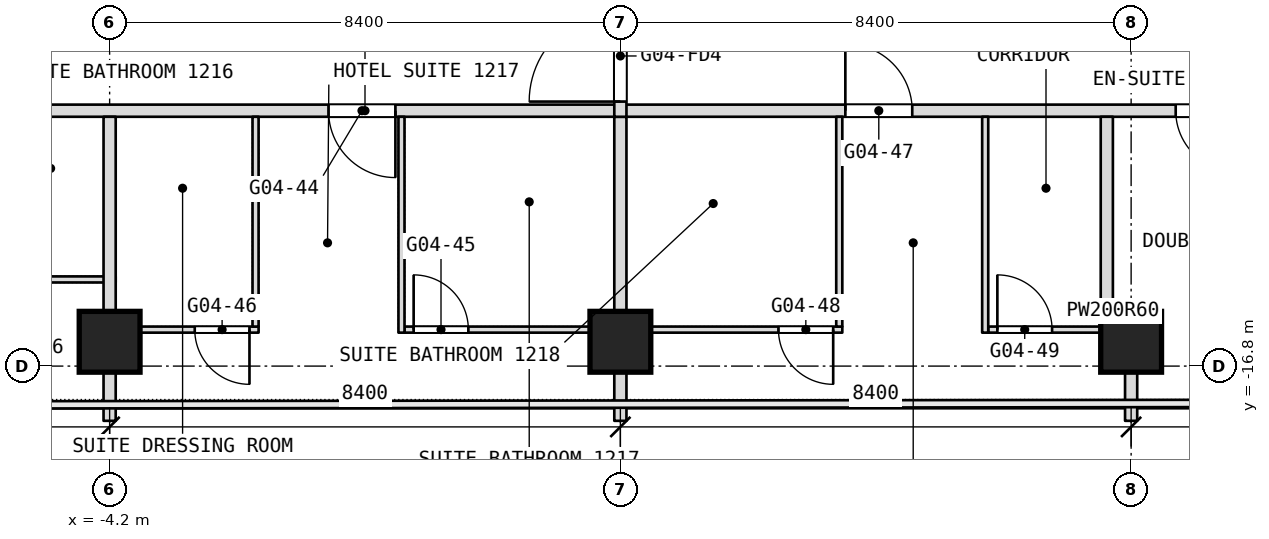
"""IFC4 building model, lengths in metres.
Left out: names, types, materials, properties, quantities, classifications, styles, units other than length and angle.
Written with IfcOpenShell. Run it as: python <this file> out.ifc"""

import sys

from ifc_helpers import new_model, si_unit, direction, frame, frame_2d, origin, origin_2d, place, context, subcontext, project, spatial, rectangle, extrude, element, fill, save


model = new_model("IFC4")
c1 = context("Model", 3, precision=1e-05, world=origin(), true_north=direction((0.0, 1.0)))
c2 = subcontext(c1, "Body", "Model", "MODEL_VIEW")
j1 = project(units=[si_unit("LENGTHUNIT", "METRE"), si_unit("PLANEANGLEUNIT", "RADIAN")], contexts=[c1])
p1 = place(None, origin())
s1 = spatial("IfcSite", under=j1, at=p1, CompositionType="ELEMENT")
p2 = place(p1, origin())
s2 = spatial("IfcBuilding", under=s1, at=p2, CompositionType="ELEMENT")
p3 = place(p2, frame((0.0, 0.0, 58.1)))
s3 = spatial("IfcBuildingStorey", under=s2, at=p3, CompositionType="ELEMENT", Elevation=58.1)
for number, where, z_axis, x_axis in (
    (1, (12.6, -16.4, 0.0), (0.0, 0.0, 1.0), (1.0, 0.0, 0.0)),
    (2, (4.2, -16.4, 0.0), (0.0, 0.0, 1.0), (1.0, 0.0, 0.0)),
    (3, (-4.2, -16.4, 0.0), (0.0, 0.0, 1.0), (1.0, 0.0, 0.0)),
):
    element("IfcColumn", number, at=place(p3, frame(where, z_axis=z_axis, x_axis=x_axis)), inside=s3, PredefinedType="COLUMN", context=c2, shape_type="SweptSolid", body=[
        extrude(rectangle(XDim=1.0, YDim=1.0, at=origin_2d()), origin(), (0.0, 0.0, 1.0), 3.6),
    ])
p4 = place(p3, frame((-4.1, -16.2, 0.0), z_axis=(0.0, 0.0, 1.0), x_axis=(1.0, 0.0, 0.0)))
e4 = element("IfcWall", 4, at=p4, inside=s3, PredefinedType="PARTITIONING", context=c2, shape_type="SweptSolid", body=[
    extrude(rectangle(XDim=2.35, YDim=0.1, at=frame_2d((1.175, 0.0))), origin(), (0.0, 0.0, 1.0), 2.94),
])
p5 = place(p4, frame((1.3, 0.0, 0.0)))
e5 = element("IfcOpeningElement", 5, at=p5, cuts=e4, PredefinedType="OPENING", context=c2, shape_type="SweptSolid", body=[
    extrude(rectangle(XDim=0.9, YDim=2.1, at=frame_2d((0.45, 1.05))), frame((0.0, 0.05, 0.0), z_axis=(0.0, -1.0, 0.0), x_axis=(1.0, 0.0, 0.0)), (0.0, 0.0, 1.0), 0.1),
])
p6 = place(p3, frame((0.65, -16.2, 0.0), z_axis=(0.0, 0.0, 1.0), x_axis=(1.0, 0.0, 0.0)))
e6 = element("IfcWall", 6, at=p6, inside=s3, PredefinedType="PARTITIONING", context=c2, shape_type="SweptSolid", body=[
    extrude(rectangle(XDim=7.2, YDim=0.1, at=frame_2d((3.6, 0.0))), origin(), (0.0, 0.0, 1.0), 2.94),
])
p7 = place(p6, frame((0.15, 0.0, 0.0)))
e7 = element("IfcOpeningElement", 7, at=p7, cuts=e6, PredefinedType="OPENING", context=c2, shape_type="SweptSolid", body=[
    extrude(rectangle(XDim=0.9, YDim=2.1, at=frame_2d((0.45, 1.05))), frame((0.0, 0.05, 0.0), z_axis=(0.0, -1.0, 0.0), x_axis=(1.0, 0.0, 0.0)), (0.0, 0.0, 1.0), 0.1),
])
p8 = place(p6, frame((6.15, 0.0, 0.0)))
e8 = element("IfcOpeningElement", 8, at=p8, cuts=e6, PredefinedType="OPENING", context=c2, shape_type="SweptSolid", body=[
    extrude(rectangle(XDim=0.9, YDim=2.1, at=frame_2d((0.45, 1.05))), frame((0.0, 0.05, 0.0), z_axis=(0.0, -1.0, 0.0), x_axis=(1.0, 0.0, 0.0)), (0.0, 0.0, 1.0), 0.1),
])
p9 = place(p3, frame((10.25, -16.2, 0.0), z_axis=(0.0, 0.0, 1.0), x_axis=(1.0, 0.0, 0.0)))
e9 = element("IfcWall", 9, at=p9, inside=s3, PredefinedType="PARTITIONING", context=c2, shape_type="SweptSolid", body=[
    extrude(rectangle(XDim=2.45, YDim=0.1, at=frame_2d((1.225, 0.0))), origin(), (0.0, 0.0, 1.0), 3.34),
])
p10 = place(p9, frame((0.15, 0.0, 0.0)))
e10 = element("IfcOpeningElement", 10, at=p10, cuts=e9, PredefinedType="OPENING", context=c2, shape_type="SweptSolid", body=[
    extrude(rectangle(XDim=0.9, YDim=2.1, at=frame_2d((0.45, 1.05))), frame((0.0, 0.05, 0.0), z_axis=(0.0, -1.0, 0.0), x_axis=(1.0, 0.0, 0.0)), (0.0, 0.0, 1.0), 0.1),
])
p11 = place(p3, frame((12.1, -15.9, 0.0), z_axis=(0.0, 0.0, 1.0), x_axis=(1.0, 0.0, 0.0)))
e11 = element("IfcWall", 11, at=p11, inside=s3, PredefinedType="PARTITIONING", context=c2, shape_type="SweptSolid", body=[
    extrude(rectangle(XDim=0.4, YDim=0.2, at=frame_2d((0.2, 0.0))), origin(), (0.0, 0.0, 1.0), 3.34),
])
p12 = place(p3, frame((-6.55, -15.375, 0.0), z_axis=(0.0, 0.0, 1.0), x_axis=(1.0, 0.0, 0.0)))
e12 = element("IfcWall", 12, at=p12, inside=s3, PredefinedType="PARTITIONING", context=c2, shape_type="SweptSolid", body=[
    extrude(rectangle(XDim=2.45, YDim=0.1, at=frame_2d((1.225, 0.0))), origin(), (0.0, 0.0, 1.0), 3.34),
])
p13 = place(p12, frame((0.15, 0.0, 0.0)))
e13 = element("IfcOpeningElement", 13, at=p13, cuts=e12, PredefinedType="OPENING", context=c2, shape_type="SweptSolid", body=[
    extrude(rectangle(XDim=0.9, YDim=2.1, at=frame_2d((0.45, 1.05))), frame((0.0, 0.05, 0.0), z_axis=(0.0, -1.0, 0.0), x_axis=(1.0, 0.0, 0.0)), (0.0, 0.0, 1.0), 0.1),
])
p14 = place(p3, frame((12.6, -17.7, 0.0), z_axis=(0.0, 0.0, 1.0), x_axis=(0.0, 1.0, 0.0)))
e14 = element("IfcWall", 14, at=p14, inside=s3, PredefinedType="PARTITIONING", context=c2, shape_type="SweptSolid", body=[
    extrude(rectangle(XDim=1.9, YDim=0.2, at=frame_2d((0.95, 0.0))), origin(), (0.0, 0.0, 1.0), 3.34),
])
p15 = place(p3, frame((-16.7, -12.6, 0.0), z_axis=(0.0, 0.0, 1.0), x_axis=(1.0, 0.0, 0.0)))
e15 = element("IfcWall", 15, at=p15, inside=s3, PredefinedType="PARTITIONING", context=c2, shape_type="SweptSolid", body=[
    extrude(rectangle(XDim=33.4, YDim=0.2, at=frame_2d((16.7, 0.0))), origin(), (0.0, 0.0, 1.0), 3.34),
])
p16 = place(p15, frame((6.9, 0.0, 0.0)))
e16 = element("IfcOpeningElement", 16, at=p16, cuts=e15, PredefinedType="OPENING", context=c2, shape_type="SweptSolid", body=[
    extrude(rectangle(XDim=1.0, YDim=2.1, at=frame_2d((0.5, 1.05))), frame((0.0, 0.1, 0.0), z_axis=(0.0, -1.0, 0.0), x_axis=(1.0, 0.0, 0.0)), (0.0, 0.0, 1.0), 0.2),
])
p17 = place(p15, frame((8.7, 0.0, 0.0)))
e17 = element("IfcOpeningElement", 17, at=p17, cuts=e15, PredefinedType="OPENING", context=c2, shape_type="SweptSolid", body=[
    extrude(rectangle(XDim=1.0, YDim=2.1, at=frame_2d((0.5, 1.05))), frame((0.0, 0.1, 0.0), z_axis=(0.0, -1.0, 0.0), x_axis=(1.0, 0.0, 0.0)), (0.0, 0.0, 1.0), 0.2),
])
p18 = place(p15, frame((16.1, 0.0, 0.0)))
e18 = element("IfcOpeningElement", 18, at=p18, cuts=e15, PredefinedType="OPENING", context=c2, shape_type="SweptSolid", body=[
    extrude(rectangle(XDim=1.1, YDim=2.1, at=frame_2d((0.55, 1.05))), frame((0.0, 0.1, 0.0), z_axis=(0.0, -1.0, 0.0), x_axis=(1.0, 0.0, 0.0)), (0.0, 0.0, 1.0), 0.2),
])
p19 = place(p15, frame((24.6, 0.0, 0.0)))
e19 = element("IfcOpeningElement", 19, at=p19, cuts=e15, PredefinedType="OPENING", context=c2, shape_type="SweptSolid", body=[
    extrude(rectangle(XDim=1.1, YDim=2.1, at=frame_2d((0.55, 1.05))), frame((0.0, 0.1, 0.0), z_axis=(0.0, -1.0, 0.0), x_axis=(1.0, 0.0, 0.0)), (0.0, 0.0, 1.0), 0.2),
])
p20 = place(p15, frame((2.317, 0.0, 0.0)))
e20 = element("IfcOpeningElement", 20, at=p20, cuts=e15, PredefinedType="OPENING", context=c2, shape_type="SweptSolid", body=[
    extrude(rectangle(XDim=1.0, YDim=2.1, at=frame_2d((0.5, 1.05))), frame((0.0, 0.1, 0.0), z_axis=(0.0, -1.0, 0.0), x_axis=(1.0, 0.0, 0.0)), (0.0, 0.0, 1.0), 0.2),
])
p21 = place(p15, frame((30.033, 0.0, 0.0)))
e21 = element("IfcOpeningElement", 21, at=p21, cuts=e15, PredefinedType="OPENING", context=c2, shape_type="SweptSolid", body=[
    extrude(rectangle(XDim=1.0, YDim=2.1, at=frame_2d((0.5, 1.05))), frame((0.0, 0.1, 0.0), z_axis=(0.0, -1.0, 0.0), x_axis=(1.0, 0.0, 0.0)), (0.0, 0.0, 1.0), 0.2),
])
p22 = place(p3, frame((12.2, -15.8, 0.0), z_axis=(0.0, 0.0, 1.0), x_axis=(0.0, 1.0, 0.0)))
e22 = element("IfcWall", 22, at=p22, inside=s3, PredefinedType="PARTITIONING", context=c2, shape_type="SweptSolid", body=[
    extrude(rectangle(XDim=3.1, YDim=0.2, at=frame_2d((1.55, 0.0))), origin(), (0.0, 0.0, 1.0), 3.34),
])
p23 = place(p3, frame((10.2, -16.25, 0.0), z_axis=(0.0, 0.0, 1.0), x_axis=(0.0, 1.0, 0.0)))
e23 = element("IfcWall", 23, at=p23, inside=s3, PredefinedType="PARTITIONING", context=c2, shape_type="SweptSolid", body=[
    extrude(rectangle(XDim=3.55, YDim=0.1, at=frame_2d((1.775, 0.0))), origin(), (0.0, 0.0, 1.0), 3.34),
])
p24 = place(p3, frame((7.8, -16.15, 0.0), z_axis=(0.0, 0.0, 1.0), x_axis=(0.0, 1.0, 0.0)))
e24 = element("IfcWall", 24, at=p24, inside=s3, PredefinedType="PARTITIONING", context=c2, shape_type="SweptSolid", body=[
    extrude(rectangle(XDim=3.45, YDim=0.1, at=frame_2d((1.725, 0.0))), origin(), (0.0, 0.0, 1.0), 3.34),
])
p25 = place(p3, frame((4.2, -17.7, 0.0), z_axis=(0.0, 0.0, 1.0), x_axis=(0.0, 1.0, 0.0)))
e25 = element("IfcWall", 25, at=p25, inside=s3, PredefinedType="PARTITIONING", context=c2, shape_type="SweptSolid", body=[
    extrude(rectangle(XDim=5.0, YDim=0.2, at=frame_2d((2.5, 0.0))), origin(), (0.0, 0.0, 1.0), 3.34),
])
p26 = place(p3, frame((4.2, -12.7, 0.0), z_axis=(0.0, 0.0, 1.0), x_axis=(0.0, 1.0, 0.0)))
e26 = element("IfcWall", 26, at=p26, inside=s3, PredefinedType="PARTITIONING", context=c2, shape_type="SweptSolid", body=[
    extrude(rectangle(XDim=12.7, YDim=0.2, at=frame_2d((6.35, 0.0))), origin(), (0.0, 0.0, 1.0), 3.34),
])
p27 = place(p26, frame((11.05, 0.0, 0.0)))
e27 = element("IfcOpeningElement", 27, at=p27, cuts=e26, PredefinedType="OPENING", context=c2, shape_type="SweptSolid", body=[
    extrude(rectangle(XDim=1.5, YDim=2.1, at=frame_2d((0.75, 1.05))), frame((0.0, 0.1, 0.0), z_axis=(0.0, -1.0, 0.0), x_axis=(1.0, 0.0, 0.0)), (0.0, 0.0, 1.0), 0.2),
])
p28 = place(p26, frame((0.25, 0.0, 0.0)))
e28 = element("IfcOpeningElement", 28, at=p28, cuts=e26, PredefinedType="OPENING", context=c2, shape_type="SweptSolid", body=[
    extrude(rectangle(XDim=1.5, YDim=2.1, at=frame_2d((0.75, 1.05))), frame((0.0, 0.1, 0.0), z_axis=(0.0, -1.0, 0.0), x_axis=(1.0, 0.0, 0.0)), (0.0, 0.0, 1.0), 0.2),
])
p29 = place(p3, frame((0.6, -16.25, 0.0), z_axis=(0.0, 0.0, 1.0), x_axis=(0.0, 1.0, 0.0)))
e29 = element("IfcWall", 29, at=p29, inside=s3, PredefinedType="PARTITIONING", context=c2, shape_type="SweptSolid", body=[
    extrude(rectangle(XDim=3.55, YDim=0.1, at=frame_2d((1.775, 0.0))), origin(), (0.0, 0.0, 1.0), 3.34),
])
p30 = place(p3, frame((-1.8, -16.15, 0.0), z_axis=(0.0, 0.0, 1.0), x_axis=(0.0, 1.0, 0.0)))
e30 = element("IfcWall", 30, at=p30, inside=s3, PredefinedType="PARTITIONING", context=c2, shape_type="SweptSolid", body=[
    extrude(rectangle(XDim=3.45, YDim=0.1, at=frame_2d((1.725, 0.0))), origin(), (0.0, 0.0, 1.0), 3.34),
])
p31 = place(p3, frame((-4.2, -17.7, 0.0), z_axis=(0.0, 0.0, 1.0), x_axis=(0.0, 1.0, 0.0)))
e31 = element("IfcWall", 31, at=p31, inside=s3, PredefinedType="PARTITIONING", context=c2, shape_type="SweptSolid", body=[
    extrude(rectangle(XDim=5.0, YDim=0.2, at=frame_2d((2.5, 0.0))), origin(), (0.0, 0.0, 1.0), 3.34),
])
p32 = place(p5, origin())
e32 = element("IfcDoor", 32, at=p32, inside=s3, OperationType="SINGLE_SWING_RIGHT", PredefinedType="DOOR", context=c2, shape_type="SweptSolid", body=[
    extrude(rectangle(XDim=0.9, YDim=2.1, at=frame_2d((0.45, 1.05))), frame((0.0, 0.025, 0.0), z_axis=(0.0, -1.0, 0.0), x_axis=(1.0, 0.0, 0.0)), (0.0, 0.0, 1.0), 0.05),
])
fill(e5, e32)
p33 = place(p7, origin())
e33 = element("IfcDoor", 33, at=p33, inside=s3, OperationType="SINGLE_SWING_LEFT", PredefinedType="DOOR", context=c2, shape_type="SweptSolid", body=[
    extrude(rectangle(XDim=0.9, YDim=2.1, at=frame_2d((0.45, 1.05))), frame((0.0, 0.025, 0.0), z_axis=(0.0, -1.0, 0.0), x_axis=(1.0, 0.0, 0.0)), (0.0, 0.0, 1.0), 0.05),
])
fill(e7, e33)
p34 = place(p8, origin())
e34 = element("IfcDoor", 34, at=p34, inside=s3, OperationType="SINGLE_SWING_RIGHT", PredefinedType="DOOR", context=c2, shape_type="SweptSolid", body=[
    extrude(rectangle(XDim=0.9, YDim=2.1, at=frame_2d((0.45, 1.05))), frame((0.0, 0.025, 0.0), z_axis=(0.0, -1.0, 0.0), x_axis=(1.0, 0.0, 0.0)), (0.0, 0.0, 1.0), 0.05),
])
fill(e8, e34)
p35 = place(p10, origin())
e35 = element("IfcDoor", 35, at=p35, inside=s3, OperationType="SINGLE_SWING_LEFT", PredefinedType="DOOR", context=c2, shape_type="SweptSolid", body=[
    extrude(rectangle(XDim=0.9, YDim=2.1, at=frame_2d((0.45, 1.05))), frame((0.0, 0.025, 0.0), z_axis=(0.0, -1.0, 0.0), x_axis=(1.0, 0.0, 0.0)), (0.0, 0.0, 1.0), 0.05),
])
fill(e10, e35)
p36 = place(p18, origin())
e36 = element("IfcDoor", 36, at=p36, inside=s3, OperationType="SINGLE_SWING_LEFT", PredefinedType="DOOR", context=c2, shape_type="SweptSolid", body=[
    extrude(rectangle(XDim=1.1, YDim=2.1, at=frame_2d((0.55, 1.05))), frame((0.0, 0.025, 0.0), z_axis=(0.0, -1.0, 0.0), x_axis=(1.0, 0.0, 0.0)), (0.0, 0.0, 1.0), 0.05),
])
fill(e18, e36)
p37 = place(p19, origin())
e37 = element("IfcDoor", 37, at=p37, inside=s3, OperationType="SINGLE_SWING_RIGHT", PredefinedType="DOOR", context=c2, shape_type="SweptSolid", body=[
    extrude(rectangle(XDim=1.1, YDim=2.1, at=frame_2d((0.55, 1.05))), frame((0.0, 0.025, 0.0), z_axis=(0.0, -1.0, 0.0), x_axis=(1.0, 0.0, 0.0)), (0.0, 0.0, 1.0), 0.05),
])
fill(e19, e37)
p38 = place(p21, origin())
e38 = element("IfcDoor", 38, at=p38, inside=s3, OperationType="SINGLE_SWING_LEFT", PredefinedType="DOOR", context=c2, shape_type="SweptSolid", body=[
    extrude(rectangle(XDim=1.0, YDim=2.1, at=frame_2d((0.5, 1.05))), frame((0.0, 0.025, 0.0), z_axis=(0.0, -1.0, 0.0), x_axis=(1.0, 0.0, 0.0)), (0.0, 0.0, 1.0), 0.05),
])
fill(e21, e38)
p39 = place(p28, origin())
e39 = element("IfcDoor", 39, at=p39, inside=s3, OperationType="DOUBLE_DOOR_DOUBLE_SWING", PredefinedType="DOOR", context=c2, shape_type="SweptSolid", body=[
    extrude(rectangle(XDim=1.5, YDim=2.1, at=frame_2d((0.75, 1.05))), frame((0.0, 0.025, 0.0), z_axis=(0.0, -1.0, 0.0), x_axis=(1.0, 0.0, 0.0)), (0.0, 0.0, 1.0), 0.05),
])
fill(e28, e39)
save(model, sys.argv[1])
